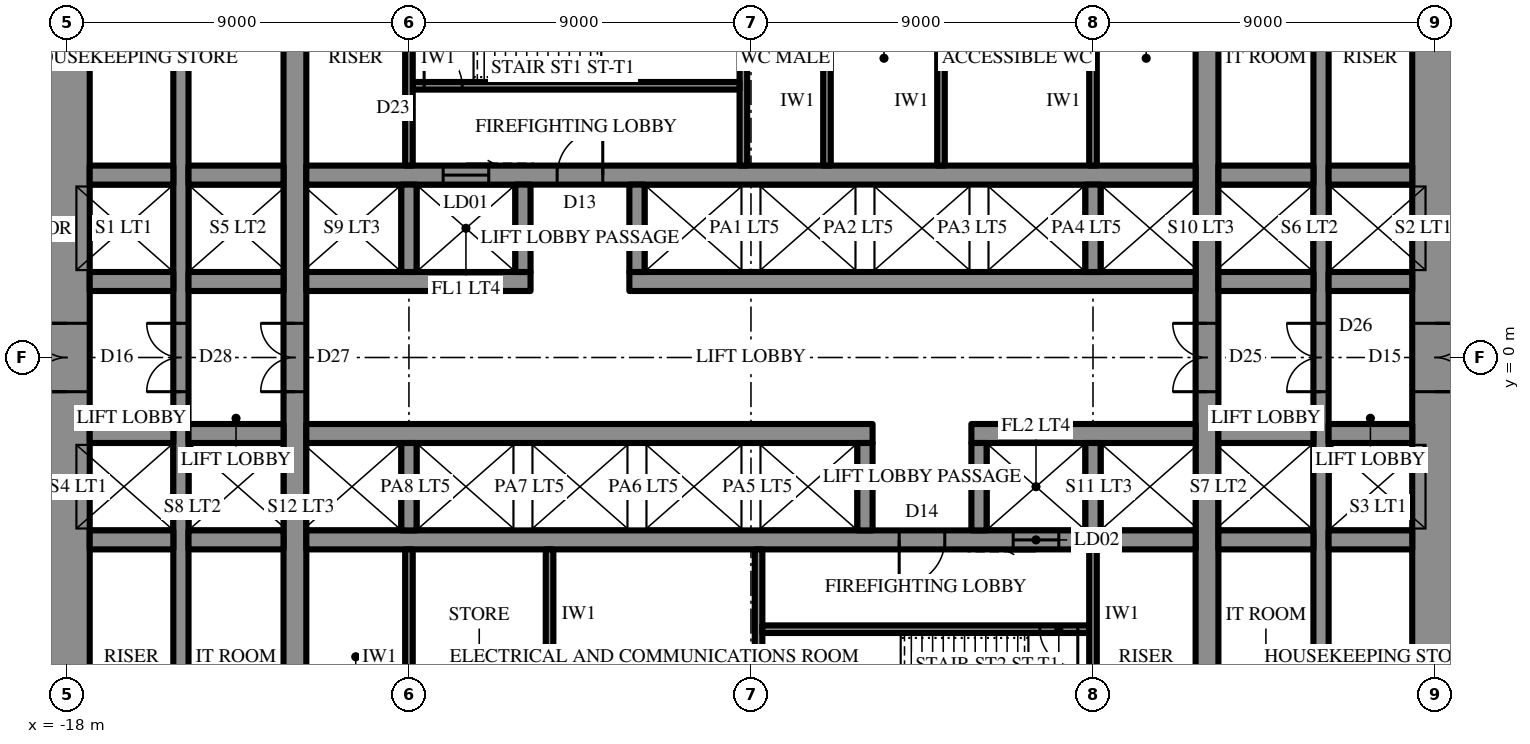
"""IFC4 building model, lengths in metres.
Left out: names, types, materials, properties, quantities, classifications, styles, units other than length and angle.
Written with IfcOpenShell. Run it as: python <this file> out.ifc"""

import sys

from ifc_helpers import new_model, si_unit, direction, frame, frame_2d, origin, place, context, subcontext, project, spatial, rectangle, extrude, element, fill, save


model = new_model("IFC4")
c1 = context("Model", 3, precision=1e-05, world=origin(), true_north=direction((0.0, 1.0)))
c2 = subcontext(c1, "Body", "Model", "MODEL_VIEW")
j1 = project(units=[si_unit("LENGTHUNIT", "METRE"), si_unit("PLANEANGLEUNIT", "RADIAN")], contexts=[c1])
p1 = place(None, origin())
s1 = spatial("IfcSite", under=j1, at=p1, CompositionType="ELEMENT")
p2 = place(p1, origin())
s2 = spatial("IfcBuilding", under=s1, at=p2, CompositionType="ELEMENT")
p3 = place(p2, frame((0.0, 0.0, -4.5)))
s3 = spatial("IfcBuildingStorey", under=s2, at=p3, CompositionType="ELEMENT", Elevation=-4.5)
p4 = place(p3, frame((18.0, -10.7, 0.0), z_axis=(0.0, 0.0, 1.0), x_axis=(0.0, 1.0, 0.0)))
e1 = element("IfcWall", 1, at=p4, inside=s3, PredefinedType="SHEAR", context=c2, shape_type="SweptSolid", body=[
    extrude(rectangle(XDim=21.4, YDim=1.2, at=frame_2d((10.7, 0.0))), origin(), (0.0, 0.0, 1.0), 4.5),
])
p5 = place(p4, frame((9.8, 0.0, 0.0)))
e2 = element("IfcOpeningElement", 2, at=p5, cuts=e1, PredefinedType="OPENING", context=c2, shape_type="SweptSolid", body=[
    extrude(rectangle(XDim=1.8, YDim=2.4, at=frame_2d((0.9, 1.2))), frame((0.0, 0.61, 0.0), z_axis=(0.0, -1.0, 0.0), x_axis=(1.0, 0.0, 0.0)), (0.0, 0.0, 1.0), 1.22),
])
p6 = place(p3, frame((-18.0, 10.7, 0.0), z_axis=(0.0, 0.0, 1.0), x_axis=(0.0, -1.0, 0.0)))
e3 = element("IfcWall", 3, at=p6, inside=s3, PredefinedType="SHEAR", context=c2, shape_type="SweptSolid", body=[
    extrude(rectangle(XDim=21.4, YDim=1.2, at=frame_2d((10.7, 0.0))), origin(), (0.0, 0.0, 1.0), 4.5),
])
p7 = place(p6, frame((9.8, 0.0, 0.0)))
e4 = element("IfcOpeningElement", 4, at=p7, cuts=e3, PredefinedType="OPENING", context=c2, shape_type="SweptSolid", body=[
    extrude(rectangle(XDim=1.8, YDim=2.4, at=frame_2d((0.9, 1.2))), frame((0.0, 0.61, 0.0), z_axis=(0.0, -1.0, 0.0), x_axis=(1.0, 0.0, 0.0)), (0.0, 0.0, 1.0), 1.22),
])
p8 = place(p3, frame((12.0, -10.7, 0.0), z_axis=(0.0, 0.0, 1.0), x_axis=(0.0, 1.0, 0.0)))
e5 = element("IfcWall", 5, at=p8, inside=s3, PredefinedType="SHEAR", context=c2, shape_type="SweptSolid", body=[
    extrude(rectangle(XDim=21.4, YDim=0.6, at=frame_2d((10.7, 0.0))), origin(), (0.0, 0.0, 1.0), 4.5),
])
p9 = place(p8, frame((9.8, 0.0, 0.0)))
e6 = element("IfcOpeningElement", 6, at=p9, cuts=e5, PredefinedType="OPENING", context=c2, shape_type="SweptSolid", body=[
    extrude(rectangle(XDim=1.8, YDim=2.4, at=frame_2d((0.9, 1.2))), frame((0.0, 0.31, 0.0), z_axis=(0.0, -1.0, 0.0), x_axis=(1.0, 0.0, 0.0)), (0.0, 0.0, 1.0), 0.62),
])
p10 = place(p3, frame((-12.0, -10.7, 0.0), z_axis=(0.0, 0.0, 1.0), x_axis=(0.0, 1.0, 0.0)))
e7 = element("IfcWall", 7, at=p10, inside=s3, PredefinedType="SHEAR", context=c2, shape_type="SweptSolid", body=[
    extrude(rectangle(XDim=21.4, YDim=0.6, at=frame_2d((10.7, 0.0))), origin(), (0.0, 0.0, 1.0), 4.5),
])
p11 = place(p10, frame((9.8, 0.0, 0.0)))
e8 = element("IfcOpeningElement", 8, at=p11, cuts=e7, PredefinedType="OPENING", context=c2, shape_type="SweptSolid", body=[
    extrude(rectangle(XDim=1.8, YDim=2.4, at=frame_2d((0.9, 1.2))), frame((0.0, 0.31, 0.0), z_axis=(0.0, -1.0, 0.0), x_axis=(1.0, 0.0, 0.0)), (0.0, 0.0, 1.0), 0.62),
])
p12 = place(p3, frame((15.0, -10.7, 0.0), z_axis=(0.0, 0.0, 1.0), x_axis=(0.0, 1.0, 0.0)))
e9 = element("IfcWall", 9, at=p12, inside=s3, PredefinedType="SHEAR", context=c2, shape_type="SweptSolid", body=[
    extrude(rectangle(XDim=21.4, YDim=0.4, at=frame_2d((10.7, 0.0))), origin(), (0.0, 0.0, 1.0), 4.5),
])
p13 = place(p12, frame((9.8, 0.0, 0.0)))
e10 = element("IfcOpeningElement", 10, at=p13, cuts=e9, PredefinedType="OPENING", context=c2, shape_type="SweptSolid", body=[
    extrude(rectangle(XDim=1.8, YDim=2.4, at=frame_2d((0.9, 1.2))), frame((0.0, 0.21, 0.0), z_axis=(0.0, -1.0, 0.0), x_axis=(1.0, 0.0, 0.0)), (0.0, 0.0, 1.0), 0.42),
])
p14 = place(p3, frame((-15.0, -10.7, 0.0), z_axis=(0.0, 0.0, 1.0), x_axis=(0.0, 1.0, 0.0)))
e11 = element("IfcWall", 11, at=p14, inside=s3, PredefinedType="SHEAR", context=c2, shape_type="SweptSolid", body=[
    extrude(rectangle(XDim=21.4, YDim=0.4, at=frame_2d((10.7, 0.0))), origin(), (0.0, 0.0, 1.0), 4.5),
])
p15 = place(p14, frame((9.8, 0.0, 0.0)))
e12 = element("IfcOpeningElement", 12, at=p15, cuts=e11, PredefinedType="OPENING", context=c2, shape_type="SweptSolid", body=[
    extrude(rectangle(XDim=1.8, YDim=2.4, at=frame_2d((0.9, 1.2))), frame((0.0, 0.21, 0.0), z_axis=(0.0, -1.0, 0.0), x_axis=(1.0, 0.0, 0.0)), (0.0, 0.0, 1.0), 0.42),
])
p16 = place(p3, frame((-17.4, 2.0, 0.0), z_axis=(0.0, 0.0, 1.0), x_axis=(1.0, 0.0, 0.0)))
e13 = element("IfcWall", 13, at=p16, inside=s3, PredefinedType="SHEAR", context=c2, shape_type="SweptSolid", body=[
    extrude(rectangle(XDim=2.2, YDim=0.5, at=frame_2d((1.1, 0.0))), origin(), (0.0, 0.0, 1.0), 4.5),
])
p17 = place(p3, frame((-14.8, 2.0, 0.0), z_axis=(0.0, 0.0, 1.0), x_axis=(1.0, 0.0, 0.0)))
e14 = element("IfcWall", 14, at=p17, inside=s3, PredefinedType="SHEAR", context=c2, shape_type="SweptSolid", body=[
    extrude(rectangle(XDim=2.5, YDim=0.5, at=frame_2d((1.25, 0.0))), origin(), (0.0, 0.0, 1.0), 4.5),
])
p18 = place(p3, frame((-11.7, 2.0, 0.0), z_axis=(0.0, 0.0, 1.0), x_axis=(1.0, 0.0, 0.0)))
e15 = element("IfcWall", 15, at=p18, inside=s3, PredefinedType="SHEAR", context=c2, shape_type="SweptSolid", body=[
    extrude(rectangle(XDim=5.9, YDim=0.5, at=frame_2d((2.95, 0.0))), origin(), (0.0, 0.0, 1.0), 4.5),
])
p19 = place(p3, frame((-3.2, 2.0, 0.0), z_axis=(0.0, 0.0, 1.0), x_axis=(1.0, 0.0, 0.0)))
e16 = element("IfcWall", 16, at=p19, inside=s3, PredefinedType="SHEAR", context=c2, shape_type="SweptSolid", body=[
    extrude(rectangle(XDim=14.9, YDim=0.5, at=frame_2d((7.45, 0.0))), origin(), (0.0, 0.0, 1.0), 4.5),
])
p20 = place(p3, frame((12.3, 2.0, 0.0), z_axis=(0.0, 0.0, 1.0), x_axis=(1.0, 0.0, 0.0)))
e17 = element("IfcWall", 17, at=p20, inside=s3, PredefinedType="SHEAR", context=c2, shape_type="SweptSolid", body=[
    extrude(rectangle(XDim=2.5, YDim=0.5, at=frame_2d((1.25, 0.0))), origin(), (0.0, 0.0, 1.0), 4.5),
])
for number, where, z_axis, x_axis in (
    (18, (15.2, 2.0, 0.0), (0.0, 0.0, 1.0), (1.0, 0.0, 0.0)),
    (19, (-17.4, 4.8, 0.0), (0.0, 0.0, 1.0), (1.0, 0.0, 0.0)),
):
    element("IfcWall", number, at=place(p3, frame(where, z_axis=z_axis, x_axis=x_axis)), inside=s3, PredefinedType="SHEAR", context=c2, shape_type="SweptSolid", body=[
        extrude(rectangle(XDim=2.2, YDim=0.5, at=frame_2d((1.1, 0.0))), origin(), (0.0, 0.0, 1.0), 4.5),
    ])
p21 = place(p3, frame((-14.8, 4.8, 0.0), z_axis=(0.0, 0.0, 1.0), x_axis=(1.0, 0.0, 0.0)))
e20 = element("IfcWall", 20, at=p21, inside=s3, PredefinedType="SHEAR", context=c2, shape_type="SweptSolid", body=[
    extrude(rectangle(XDim=2.5, YDim=0.5, at=frame_2d((1.25, 0.0))), origin(), (0.0, 0.0, 1.0), 4.5),
])
p22 = place(p3, frame((-11.7, 4.8, 0.0), z_axis=(0.0, 0.0, 1.0), x_axis=(1.0, 0.0, 0.0)))
e21 = element("IfcWall", 21, at=p22, inside=s3, PredefinedType="SHEAR", context=c2, shape_type="SweptSolid", body=[
    extrude(rectangle(XDim=23.4, YDim=0.5, at=frame_2d((11.7, 0.0))), origin(), (0.0, 0.0, 1.0), 4.5),
])
p23 = place(p22, frame((6.6, 0.0, 0.0)))
e22 = element("IfcOpeningElement", 22, at=p23, cuts=e21, PredefinedType="OPENING", context=c2, shape_type="SweptSolid", body=[
    extrude(rectangle(XDim=1.2, YDim=2.2, at=frame_2d((0.6, 1.1))), frame((0.0, 0.26, 0.0), z_axis=(0.0, -1.0, 0.0), x_axis=(1.0, 0.0, 0.0)), (0.0, 0.0, 1.0), 0.52),
])
p24 = place(p22, frame((3.6, 0.0, 0.0)))
e23 = element("IfcOpeningElement", 23, at=p24, cuts=e21, PredefinedType="OPENING", context=c2, shape_type="SweptSolid", body=[
    extrude(rectangle(XDim=1.2, YDim=2.2, at=frame_2d((0.6, 1.1))), frame((0.0, 0.26, 0.0), z_axis=(0.0, -1.0, 0.0), x_axis=(1.0, 0.0, 0.0)), (0.0, 0.0, 1.0), 0.52),
])
p25 = place(p3, frame((12.3, 4.8, 0.0), z_axis=(0.0, 0.0, 1.0), x_axis=(1.0, 0.0, 0.0)))
e24 = element("IfcWall", 24, at=p25, inside=s3, PredefinedType="SHEAR", context=c2, shape_type="SweptSolid", body=[
    extrude(rectangle(XDim=2.5, YDim=0.5, at=frame_2d((1.25, 0.0))), origin(), (0.0, 0.0, 1.0), 4.5),
])
p26 = place(p3, frame((15.2, 4.8, 0.0), z_axis=(0.0, 0.0, 1.0), x_axis=(1.0, 0.0, 0.0)))
e25 = element("IfcWall", 25, at=p26, inside=s3, PredefinedType="SHEAR", context=c2, shape_type="SweptSolid", body=[
    extrude(rectangle(XDim=2.2, YDim=0.5, at=frame_2d((1.1, 0.0))), origin(), (0.0, 0.0, 1.0), 4.5),
])
for number, where, z_axis, x_axis in (
    (26, (-9.0, 2.25, 0.0), (0.0, 0.0, 1.0), (0.0, 1.0, 0.0)),
    (27, (-6.0, 2.25, 0.0), (0.0, 0.0, 1.0), (0.0, 1.0, 0.0)),
    (28, (-3.0, 2.25, 0.0), (0.0, 0.0, 1.0), (0.0, 1.0, 0.0)),
    (29, (9.0, 2.25, 0.0), (0.0, 0.0, 1.0), (0.0, 1.0, 0.0)),
):
    element("IfcWall", number, at=place(p3, frame(where, z_axis=z_axis, x_axis=x_axis)), inside=s3, PredefinedType="SHEAR", context=c2, shape_type="SweptSolid", body=[
        extrude(rectangle(XDim=2.3, YDim=0.4, at=frame_2d((1.15, 0.0))), origin(), (0.0, 0.0, 1.0), 4.5),
    ])
p27 = place(p3, frame((-0.2, 5.05, 0.0), z_axis=(0.0, 0.0, 1.0), x_axis=(0.0, 1.0, 0.0)))
e30 = element("IfcWall", 30, at=p27, inside=s3, PredefinedType="SHEAR", context=c2, shape_type="SweptSolid", body=[
    extrude(rectangle(XDim=5.65, YDim=0.2, at=frame_2d((2.825, 0.0))), origin(), (0.0, 0.0, 1.0), 4.5),
])
p28 = place(p3, frame((-8.9, 7.15, 0.0), z_axis=(0.0, 0.0, 1.0), x_axis=(1.0, 0.0, 0.0)))
e31 = element("IfcWall", 31, at=p28, inside=s3, PredefinedType="SHEAR", context=c2, shape_type="SweptSolid", body=[
    extrude(rectangle(XDim=8.6, YDim=0.2, at=frame_2d((4.3, 0.0))), origin(), (0.0, 0.0, 1.0), 4.5),
])
p29 = place(p28, frame((0.3, 0.0, 0.0)))
e32 = element("IfcOpeningElement", 32, at=p29, cuts=e31, PredefinedType="OPENING", context=c2, shape_type="SweptSolid", body=[
    extrude(rectangle(XDim=1.0, YDim=2.2, at=frame_2d((0.5, 1.1))), frame((0.0, 0.11, 0.0), z_axis=(0.0, -1.0, 0.0), x_axis=(1.0, 0.0, 0.0)), (0.0, 0.0, 1.0), 0.22),
])
p30 = place(p3, frame((17.4, -2.0, 0.0), z_axis=(0.0, 0.0, 1.0), x_axis=(-1.0, 0.0, 0.0)))
e33 = element("IfcWall", 33, at=p30, inside=s3, PredefinedType="SHEAR", context=c2, shape_type="SweptSolid", body=[
    extrude(rectangle(XDim=2.2, YDim=0.5, at=frame_2d((1.1, 0.0))), origin(), (0.0, 0.0, 1.0), 4.5),
])
p31 = place(p3, frame((14.8, -2.0, 0.0), z_axis=(0.0, 0.0, 1.0), x_axis=(-1.0, 0.0, 0.0)))
e34 = element("IfcWall", 34, at=p31, inside=s3, PredefinedType="SHEAR", context=c2, shape_type="SweptSolid", body=[
    extrude(rectangle(XDim=2.5, YDim=0.5, at=frame_2d((1.25, 0.0))), origin(), (0.0, 0.0, 1.0), 4.5),
])
p32 = place(p3, frame((11.7, -2.0, 0.0), z_axis=(0.0, 0.0, 1.0), x_axis=(-1.0, 0.0, 0.0)))
e35 = element("IfcWall", 35, at=p32, inside=s3, PredefinedType="SHEAR", context=c2, shape_type="SweptSolid", body=[
    extrude(rectangle(XDim=5.9, YDim=0.5, at=frame_2d((2.95, 0.0))), origin(), (0.0, 0.0, 1.0), 4.5),
])
p33 = place(p3, frame((3.2, -2.0, 0.0), z_axis=(0.0, 0.0, 1.0), x_axis=(-1.0, 0.0, 0.0)))
e36 = element("IfcWall", 36, at=p33, inside=s3, PredefinedType="SHEAR", context=c2, shape_type="SweptSolid", body=[
    extrude(rectangle(XDim=14.9, YDim=0.5, at=frame_2d((7.45, 0.0))), origin(), (0.0, 0.0, 1.0), 4.5),
])
p34 = place(p3, frame((-12.3, -2.0, 0.0), z_axis=(0.0, 0.0, 1.0), x_axis=(-1.0, 0.0, 0.0)))
e37 = element("IfcWall", 37, at=p34, inside=s3, PredefinedType="SHEAR", context=c2, shape_type="SweptSolid", body=[
    extrude(rectangle(XDim=2.5, YDim=0.5, at=frame_2d((1.25, 0.0))), origin(), (0.0, 0.0, 1.0), 4.5),
])
for number, where, z_axis, x_axis in (
    (38, (-15.2, -2.0, 0.0), (0.0, 0.0, 1.0), (-1.0, 0.0, 0.0)),
    (39, (17.4, -4.8, 0.0), (0.0, 0.0, 1.0), (-1.0, 0.0, 0.0)),
):
    element("IfcWall", number, at=place(p3, frame(where, z_axis=z_axis, x_axis=x_axis)), inside=s3, PredefinedType="SHEAR", context=c2, shape_type="SweptSolid", body=[
        extrude(rectangle(XDim=2.2, YDim=0.5, at=frame_2d((1.1, 0.0))), origin(), (0.0, 0.0, 1.0), 4.5),
    ])
p35 = place(p3, frame((14.8, -4.8, 0.0), z_axis=(0.0, 0.0, 1.0), x_axis=(-1.0, 0.0, 0.0)))
e40 = element("IfcWall", 40, at=p35, inside=s3, PredefinedType="SHEAR", context=c2, shape_type="SweptSolid", body=[
    extrude(rectangle(XDim=2.5, YDim=0.5, at=frame_2d((1.25, 0.0))), origin(), (0.0, 0.0, 1.0), 4.5),
])
p36 = place(p3, frame((11.7, -4.8, 0.0), z_axis=(0.0, 0.0, 1.0), x_axis=(-1.0, 0.0, 0.0)))
e41 = element("IfcWall", 41, at=p36, inside=s3, PredefinedType="SHEAR", context=c2, shape_type="SweptSolid", body=[
    extrude(rectangle(XDim=23.4, YDim=0.5, at=frame_2d((11.7, 0.0))), origin(), (0.0, 0.0, 1.0), 4.5),
])
p37 = place(p36, frame((6.6, 0.0, 0.0)))
e42 = element("IfcOpeningElement", 42, at=p37, cuts=e41, PredefinedType="OPENING", context=c2, shape_type="SweptSolid", body=[
    extrude(rectangle(XDim=1.2, YDim=2.2, at=frame_2d((0.6, 1.1))), frame((0.0, 0.26, 0.0), z_axis=(0.0, -1.0, 0.0), x_axis=(1.0, 0.0, 0.0)), (0.0, 0.0, 1.0), 0.52),
])
p38 = place(p36, frame((3.6, 0.0, 0.0)))
e43 = element("IfcOpeningElement", 43, at=p38, cuts=e41, PredefinedType="OPENING", context=c2, shape_type="SweptSolid", body=[
    extrude(rectangle(XDim=1.2, YDim=2.2, at=frame_2d((0.6, 1.1))), frame((0.0, 0.26, 0.0), z_axis=(0.0, -1.0, 0.0), x_axis=(1.0, 0.0, 0.0)), (0.0, 0.0, 1.0), 0.52),
])
p39 = place(p3, frame((-12.3, -4.8, 0.0), z_axis=(0.0, 0.0, 1.0), x_axis=(-1.0, 0.0, 0.0)))
e44 = element("IfcWall", 44, at=p39, inside=s3, PredefinedType="SHEAR", context=c2, shape_type="SweptSolid", body=[
    extrude(rectangle(XDim=2.5, YDim=0.5, at=frame_2d((1.25, 0.0))), origin(), (0.0, 0.0, 1.0), 4.5),
])
p40 = place(p3, frame((-15.2, -4.8, 0.0), z_axis=(0.0, 0.0, 1.0), x_axis=(-1.0, 0.0, 0.0)))
e45 = element("IfcWall", 45, at=p40, inside=s3, PredefinedType="SHEAR", context=c2, shape_type="SweptSolid", body=[
    extrude(rectangle(XDim=2.2, YDim=0.5, at=frame_2d((1.1, 0.0))), origin(), (0.0, 0.0, 1.0), 4.5),
])
for number, where, z_axis, x_axis in (
    (46, (9.0, -2.25, 0.0), (0.0, 0.0, 1.0), (0.0, -1.0, 0.0)),
    (47, (6.0, -2.25, 0.0), (0.0, 0.0, 1.0), (0.0, -1.0, 0.0)),
    (48, (3.0, -2.25, 0.0), (0.0, 0.0, 1.0), (0.0, -1.0, 0.0)),
    (49, (-9.0, -2.25, 0.0), (0.0, 0.0, 1.0), (0.0, -1.0, 0.0)),
):
    element("IfcWall", number, at=place(p3, frame(where, z_axis=z_axis, x_axis=x_axis)), inside=s3, PredefinedType="SHEAR", context=c2, shape_type="SweptSolid", body=[
        extrude(rectangle(XDim=2.3, YDim=0.4, at=frame_2d((1.15, 0.0))), origin(), (0.0, 0.0, 1.0), 4.5),
    ])
p41 = place(p3, frame((0.2, -5.05, 0.0), z_axis=(0.0, 0.0, 1.0), x_axis=(0.0, -1.0, 0.0)))
e50 = element("IfcWall", 50, at=p41, inside=s3, PredefinedType="SHEAR", context=c2, shape_type="SweptSolid", body=[
    extrude(rectangle(XDim=5.65, YDim=0.2, at=frame_2d((2.825, 0.0))), origin(), (0.0, 0.0, 1.0), 4.5),
])
p42 = place(p3, frame((8.9, -7.15, 0.0), z_axis=(0.0, 0.0, 1.0), x_axis=(-1.0, 0.0, 0.0)))
e51 = element("IfcWall", 51, at=p42, inside=s3, PredefinedType="SHEAR", context=c2, shape_type="SweptSolid", body=[
    extrude(rectangle(XDim=8.6, YDim=0.2, at=frame_2d((4.3, 0.0))), origin(), (0.0, 0.0, 1.0), 4.5),
])
p43 = place(p42, frame((0.3, 0.0, 0.0)))
e52 = element("IfcOpeningElement", 52, at=p43, cuts=e51, PredefinedType="OPENING", context=c2, shape_type="SweptSolid", body=[
    extrude(rectangle(XDim=1.0, YDim=2.2, at=frame_2d((0.5, 1.1))), frame((0.0, 0.11, 0.0), z_axis=(0.0, -1.0, 0.0), x_axis=(1.0, 0.0, 0.0)), (0.0, 0.0, 1.0), 0.22),
])
for number, where, z_axis, x_axis in (
    (53, (-9.0, 5.05, 0.0), (0.0, 0.0, 1.0), (0.0, 1.0, 0.0)),
    (54, (9.0, 5.05, 0.0), (0.0, 0.0, 1.0), (0.0, 1.0, 0.0)),
    (55, (2.0, 5.05, 0.0), (0.0, 0.0, 1.0), (0.0, 1.0, 0.0)),
    (56, (5.0, 5.05, 0.0), (0.0, 0.0, 1.0), (0.0, 1.0, 0.0)),
    (57, (9.0, -5.05, 0.0), (0.0, 0.0, 1.0), (0.0, -1.0, 0.0)),
    (58, (-9.0, -5.05, 0.0), (0.0, 0.0, 1.0), (0.0, -1.0, 0.0)),
    (59, (-5.3, -5.05, 0.0), (0.0, 0.0, 1.0), (0.0, -1.0, 0.0)),
):
    element("IfcWall", number, at=place(p3, frame(where, z_axis=z_axis, x_axis=x_axis)), inside=s3, PredefinedType="PARTITIONING", context=c2, shape_type="SweptSolid", body=[
        extrude(rectangle(XDim=5.65, YDim=0.2, at=frame_2d((2.825, 0.0))), origin(), (0.0, 0.0, 1.0), 4.15),
    ])
p44 = place(p5, frame((1.8, 0.0, 0.0), z_axis=(0.0, 0.0, 1.0), x_axis=(-1.0, 0.0, 0.0)))
e60 = element("IfcDoor", 60, at=p44, inside=s3, OperationType="DOUBLE_DOOR_SINGLE_SWING", PredefinedType="DOOR", context=c2, shape_type="SweptSolid", body=[
    extrude(rectangle(XDim=1.8, YDim=2.4, at=frame_2d((0.9, 1.2))), frame((0.0, 0.025, 0.0), z_axis=(0.0, -1.0, 0.0), x_axis=(1.0, 0.0, 0.0)), (0.0, 0.0, 1.0), 0.05),
])
fill(e2, e60)
p45 = place(p7, frame((1.8, 0.0, 0.0), z_axis=(0.0, 0.0, 1.0), x_axis=(-1.0, 0.0, 0.0)))
e61 = element("IfcDoor", 61, at=p45, inside=s3, OperationType="DOUBLE_DOOR_SINGLE_SWING", PredefinedType="DOOR", context=c2, shape_type="SweptSolid", body=[
    extrude(rectangle(XDim=1.8, YDim=2.4, at=frame_2d((0.9, 1.2))), frame((0.0, 0.025, 0.0), z_axis=(0.0, -1.0, 0.0), x_axis=(1.0, 0.0, 0.0)), (0.0, 0.0, 1.0), 0.05),
])
fill(e4, e61)
p46 = place(p23, origin())
e62 = element("IfcDoor", 62, at=p46, inside=s3, OperationType="SINGLE_SWING_LEFT", PredefinedType="DOOR", context=c2, shape_type="SweptSolid", body=[
    extrude(rectangle(XDim=1.2, YDim=2.2, at=frame_2d((0.6, 1.1))), frame((0.0, 0.025, 0.0), z_axis=(0.0, -1.0, 0.0), x_axis=(1.0, 0.0, 0.0)), (0.0, 0.0, 1.0), 0.05),
])
fill(e22, e62)
p47 = place(p29, origin())
e63 = element("IfcDoor", 63, at=p47, inside=s3, OperationType="SINGLE_SWING_RIGHT", PredefinedType="DOOR", context=c2, shape_type="SweptSolid", body=[
    extrude(rectangle(XDim=1.0, YDim=2.2, at=frame_2d((0.5, 1.1))), frame((0.0, 0.025, 0.0), z_axis=(0.0, -1.0, 0.0), x_axis=(1.0, 0.0, 0.0)), (0.0, 0.0, 1.0), 0.05),
])
fill(e32, e63)
p48 = place(p37, origin())
e64 = element("IfcDoor", 64, at=p48, inside=s3, OperationType="SINGLE_SWING_LEFT", PredefinedType="DOOR", context=c2, shape_type="SweptSolid", body=[
    extrude(rectangle(XDim=1.2, YDim=2.2, at=frame_2d((0.6, 1.1))), frame((0.0, 0.025, 0.0), z_axis=(0.0, -1.0, 0.0), x_axis=(1.0, 0.0, 0.0)), (0.0, 0.0, 1.0), 0.05),
])
fill(e42, e64)
p49 = place(p43, origin())
e65 = element("IfcDoor", 65, at=p49, inside=s3, OperationType="SINGLE_SWING_RIGHT", PredefinedType="DOOR", context=c2, shape_type="SweptSolid", body=[
    extrude(rectangle(XDim=1.0, YDim=2.2, at=frame_2d((0.5, 1.1))), frame((0.0, 0.025, 0.0), z_axis=(0.0, -1.0, 0.0), x_axis=(1.0, 0.0, 0.0)), (0.0, 0.0, 1.0), 0.05),
])
fill(e52, e65)
p50 = place(p9, origin())
e66 = element("IfcDoor", 66, at=p50, inside=s3, OperationType="DOUBLE_DOOR_SINGLE_SWING", PredefinedType="DOOR", context=c2, shape_type="SweptSolid", body=[
    extrude(rectangle(XDim=1.8, YDim=2.4, at=frame_2d((0.9, 1.2))), frame((0.0, 0.025, 0.0), z_axis=(0.0, -1.0, 0.0), x_axis=(1.0, 0.0, 0.0)), (0.0, 0.0, 1.0), 0.05),
])
fill(e6, e66)
p51 = place(p11, origin())
e67 = element("IfcDoor", 67, at=p51, inside=s3, OperationType="DOUBLE_DOOR_SINGLE_SWING", PredefinedType="DOOR", context=c2, shape_type="SweptSolid", body=[
    extrude(rectangle(XDim=1.8, YDim=2.4, at=frame_2d((0.9, 1.2))), frame((0.0, 0.025, 0.0), z_axis=(0.0, -1.0, 0.0), x_axis=(1.0, 0.0, 0.0)), (0.0, 0.0, 1.0), 0.05),
])
fill(e8, e67)
p52 = place(p13, origin())
e68 = element("IfcDoor", 68, at=p52, inside=s3, OperationType="DOUBLE_DOOR_SINGLE_SWING", PredefinedType="DOOR", context=c2, shape_type="SweptSolid", body=[
    extrude(rectangle(XDim=1.8, YDim=2.4, at=frame_2d((0.9, 1.2))), frame((0.0, 0.025, 0.0), z_axis=(0.0, -1.0, 0.0), x_axis=(1.0, 0.0, 0.0)), (0.0, 0.0, 1.0), 0.05),
])
fill(e10, e68)
p53 = place(p15, origin())
e69 = element("IfcDoor", 69, at=p53, inside=s3, OperationType="DOUBLE_DOOR_SINGLE_SWING", PredefinedType="DOOR", context=c2, shape_type="SweptSolid", body=[
    extrude(rectangle(XDim=1.8, YDim=2.4, at=frame_2d((0.9, 1.2))), frame((0.0, 0.025, 0.0), z_axis=(0.0, -1.0, 0.0), x_axis=(1.0, 0.0, 0.0)), (0.0, 0.0, 1.0), 0.05),
])
fill(e12, e69)
p54 = place(p24, origin())
e70 = element("IfcDoor", 70, at=p54, inside=s3, OperationType="SLIDING_TO_LEFT", PredefinedType="DOOR", context=c2, shape_type="SweptSolid", body=[
    extrude(rectangle(XDim=1.2, YDim=2.2, at=frame_2d((0.6, 1.1))), frame((0.0, 0.025, 0.0), z_axis=(0.0, -1.0, 0.0), x_axis=(1.0, 0.0, 0.0)), (0.0, 0.0, 1.0), 0.05),
])
fill(e23, e70)
p55 = place(p38, origin())
e71 = element("IfcDoor", 71, at=p55, inside=s3, OperationType="SLIDING_TO_LEFT", PredefinedType="DOOR", context=c2, shape_type="SweptSolid", body=[
    extrude(rectangle(XDim=1.2, YDim=2.2, at=frame_2d((0.6, 1.1))), frame((0.0, 0.025, 0.0), z_axis=(0.0, -1.0, 0.0), x_axis=(1.0, 0.0, 0.0)), (0.0, 0.0, 1.0), 0.05),
])
fill(e43, e71)
save(model, sys.argv[1])
